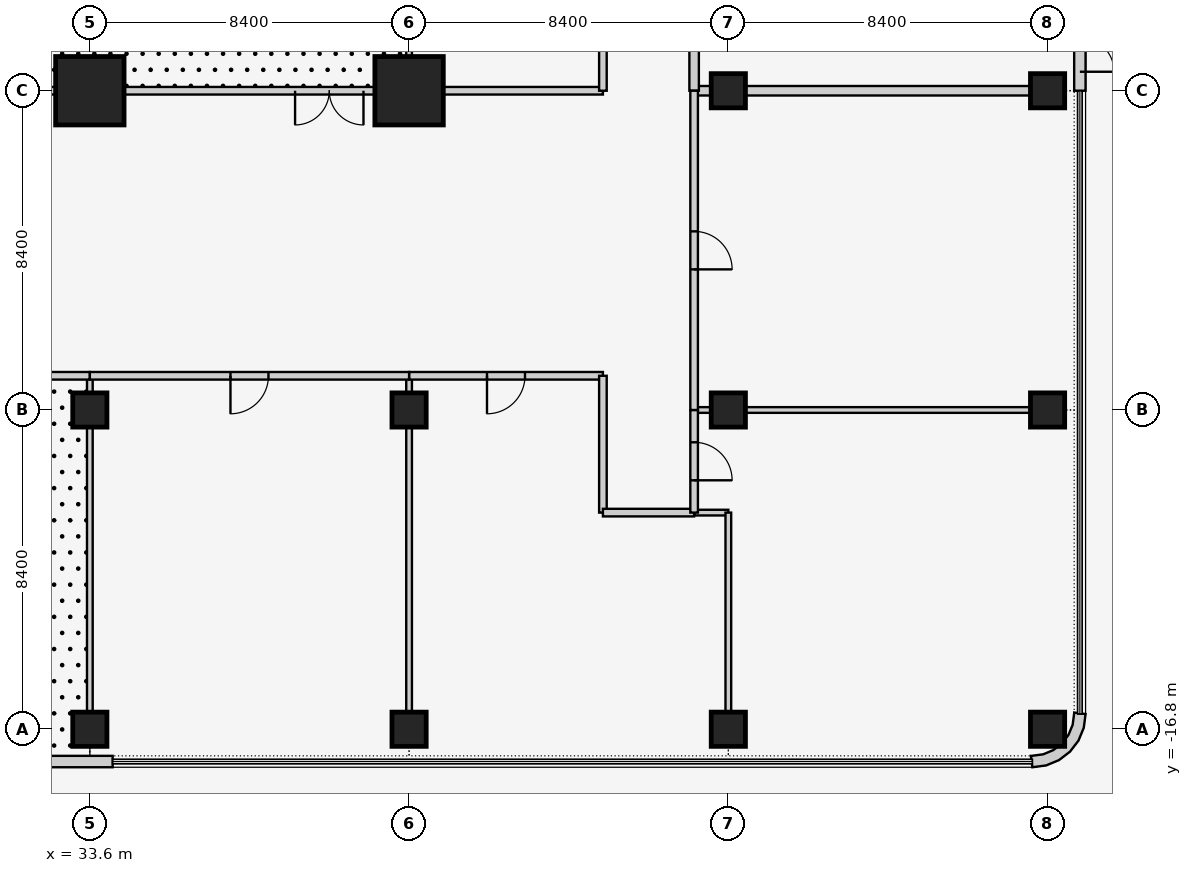
"""IFC4 building model, lengths in metres.
Left out: names, types, materials, properties, quantities, classifications, styles, units other than length and angle.
Written with IfcOpenShell. Run it as: python <this file> out.ifc"""

import sys

from ifc_helpers import new_model, si_unit, direction, frame, frame_2d, origin, origin_2d, place, context, subcontext, project, spatial, polyline, rectangle, outline, extrude, element, fill, save


model = new_model("IFC4")
c1 = context("Model", 3, precision=1e-05, world=origin(), true_north=direction((0.0, 1.0)))
c2 = subcontext(c1, "Body", "Model", "MODEL_VIEW")
j1 = project(units=[si_unit("LENGTHUNIT", "METRE"), si_unit("PLANEANGLEUNIT", "RADIAN")], contexts=[c1])
p1 = place(None, origin())
s1 = spatial("IfcSite", under=j1, at=p1, CompositionType="ELEMENT")
p2 = place(p1, origin())
s2 = spatial("IfcBuilding", under=s1, at=p2, CompositionType="ELEMENT")
p3 = place(p2, origin())
s3 = spatial("IfcBuildingStorey", under=s2, at=p3, CompositionType="ELEMENT", Elevation=0.0)
for number, where, z_axis, x_axis in (
    (1, (33.6, -16.8, 0.0), (0.0, 0.0, 1.0), (1.0, 0.0, 0.0)),
    (2, (33.6, -8.4, 0.0), (0.0, 0.0, 1.0), (1.0, 0.0, 0.0)),
):
    element("IfcColumn", number, at=place(p3, frame(where, z_axis=z_axis, x_axis=x_axis)), inside=s3, PredefinedType="COLUMN", context=c2, shape_type="SweptSolid", body=[
        extrude(rectangle(XDim=0.9, YDim=0.9, at=origin_2d()), origin(), (0.0, 0.0, 1.0), 6.0),
    ])
p4 = place(p3, frame((33.6, 0.0, 0.0), z_axis=(0.0, 0.0, 1.0), x_axis=(1.0, 0.0, 0.0)))
e3 = element("IfcColumn", 3, at=p4, inside=s3, PredefinedType="COLUMN", context=c2, shape_type="SweptSolid", body=[
    extrude(rectangle(XDim=1.8, YDim=1.8, at=origin_2d()), origin(), (0.0, 0.0, 1.0), 6.0),
])
for number, where, z_axis, x_axis in (
    (4, (42.0, -16.8, 0.0), (0.0, 0.0, 1.0), (1.0, 0.0, 0.0)),
    (5, (42.0, -8.4, 0.0), (0.0, 0.0, 1.0), (1.0, 0.0, 0.0)),
):
    element("IfcColumn", number, at=place(p3, frame(where, z_axis=z_axis, x_axis=x_axis)), inside=s3, PredefinedType="COLUMN", context=c2, shape_type="SweptSolid", body=[
        extrude(rectangle(XDim=0.9, YDim=0.9, at=origin_2d()), origin(), (0.0, 0.0, 1.0), 6.0),
    ])
p5 = place(p3, frame((42.0, 0.0, 0.0), z_axis=(0.0, 0.0, 1.0), x_axis=(1.0, 0.0, 0.0)))
e6 = element("IfcColumn", 6, at=p5, inside=s3, PredefinedType="COLUMN", context=c2, shape_type="SweptSolid", body=[
    extrude(rectangle(XDim=1.8, YDim=1.8, at=origin_2d()), origin(), (0.0, 0.0, 1.0), 6.0),
])
for number, where, z_axis, x_axis in (
    (7, (50.4, -16.8, 0.0), (0.0, 0.0, 1.0), (1.0, 0.0, 0.0)),
    (8, (50.4, -8.4, 0.0), (0.0, 0.0, 1.0), (1.0, 0.0, 0.0)),
    (9, (50.4, 0.0, 0.0), (0.0, 0.0, 1.0), (1.0, 0.0, 0.0)),
    (10, (58.8, -16.8, 0.0), (0.0, 0.0, 1.0), (1.0, 0.0, 0.0)),
    (11, (58.8, -8.4, 0.0), (0.0, 0.0, 1.0), (1.0, 0.0, 0.0)),
    (12, (58.8, 0.0, 0.0), (0.0, 0.0, 1.0), (1.0, 0.0, 0.0)),
):
    element("IfcColumn", number, at=place(p3, frame(where, z_axis=z_axis, x_axis=x_axis)), inside=s3, PredefinedType="COLUMN", context=c2, shape_type="SweptSolid", body=[
        extrude(rectangle(XDim=0.9, YDim=0.9, at=origin_2d()), origin(), (0.0, 0.0, 1.0), 6.0),
    ])
p6 = place(p3, frame((59.65, 0.0, 0.0), z_axis=(0.0, 0.0, 1.0), x_axis=(0.0, 1.0, 0.0)))
e13 = element("IfcWall", 13, at=p6, inside=s3, PredefinedType="SOLIDWALL", context=c2, shape_type="SweptSolid", body=[
    extrude(rectangle(XDim=3.0, YDim=0.3, at=frame_2d((1.5, 0.0))), origin(), (0.0, 0.0, 1.0), 5.8),
])
p7 = place(p6, frame((0.5, 0.0, 0.0)))
e14 = element("IfcOpeningElement", 14, at=p7, cuts=e13, PredefinedType="OPENING", context=c2, shape_type="SweptSolid", body=[
    extrude(rectangle(XDim=1.8, YDim=2.4, at=frame_2d((0.9, 1.2))), frame((0.0, 0.16, 0.0), z_axis=(0.0, -1.0, 0.0), x_axis=(1.0, 0.0, 0.0)), (0.0, 0.0, 1.0), 0.32),
])
p8 = place(p3, frame((16.8, -17.65, 0.0), z_axis=(0.0, 0.0, 1.0), x_axis=(1.0, 0.0, 0.0)))
e15 = element("IfcWall", 15, at=p8, inside=s3, PredefinedType="SOLIDWALL", context=c2, shape_type="SweptSolid", body=[
    extrude(rectangle(XDim=17.4, YDim=0.3, at=frame_2d((8.7, 0.0))), origin(), (0.0, 0.0, 1.0), 5.8),
])
p9 = place(p8, frame((1.8, 0.0, 0.0)))
e16 = element("IfcOpeningElement", 16, at=p9, cuts=e15, PredefinedType="OPENING", context=c2, shape_type="SweptSolid", body=[
    extrude(rectangle(XDim=1.8, YDim=2.4, at=frame_2d((0.9, 1.2))), frame((0.0, 0.16, 0.0), z_axis=(0.0, -1.0, 0.0), x_axis=(1.0, 0.0, 0.0)), (0.0, 0.0, 1.0), 0.32),
])
p10 = place(p8, frame((6.0, 0.0, 0.0)))
e17 = element("IfcOpeningElement", 17, at=p10, cuts=e15, PredefinedType="OPENING", context=c2, shape_type="SweptSolid", body=[
    extrude(rectangle(XDim=1.8, YDim=2.4, at=frame_2d((0.9, 1.2))), frame((0.0, 0.16, 0.0), z_axis=(0.0, -1.0, 0.0), x_axis=(1.0, 0.0, 0.0)), (0.0, 0.0, 1.0), 0.32),
])
p11 = place(p8, frame((9.6, 0.0, 0.0)))
e18 = element("IfcOpeningElement", 18, at=p11, cuts=e15, PredefinedType="OPENING", context=c2, shape_type="SweptSolid", body=[
    extrude(rectangle(XDim=1.8, YDim=2.4, at=frame_2d((0.9, 1.2))), frame((0.0, 0.16, 0.0), z_axis=(0.0, -1.0, 0.0), x_axis=(1.0, 0.0, 0.0)), (0.0, 0.0, 1.0), 0.32),
])
p12 = place(p8, frame((13.8, 0.0, 0.0)))
e19 = element("IfcOpeningElement", 19, at=p12, cuts=e15, PredefinedType="OPENING", context=c2, shape_type="SweptSolid", body=[
    extrude(rectangle(XDim=1.8, YDim=2.4, at=frame_2d((0.9, 1.2))), frame((0.0, 0.16, 0.0), z_axis=(0.0, -1.0, 0.0), x_axis=(1.0, 0.0, 0.0)), (0.0, 0.0, 1.0), 0.32),
])
p13 = place(p3, frame((58.355, -17.648, 0.0), z_axis=(0.0, 0.0, 1.0), x_axis=(0.707106781187, -0.707106781187, 0.0)))
e20 = element("IfcWall", 20, at=p13, inside=s3, PredefinedType="SOLIDWALL", context=c2, shape_type="SweptSolid", body=[
    extrude(outline(polyline([(0.139, 1.904), (-0.101, 1.72), (-0.087, 1.706), (0.1, 1.463), (0.209, 1.198), (0.246, 0.914), (0.209, 0.63), (0.1, 0.365), (-0.087, 0.122), (-0.101, 0.108), (0.139, -0.076), (0.362, 0.214), (0.502, 0.552), (0.549, 0.914), (0.502, 1.276), (0.362, 1.614), (0.139, 1.904)])), origin(), (0.0, 0.0, 1.0), 5.8),
])
p14 = place(p3, frame((49.95, 0.0, 0.0), z_axis=(0.0, 0.0, 1.0), x_axis=(-1.0, 0.0, 0.0)))
e21 = element("IfcWall", 21, at=p14, inside=s3, PredefinedType="SOLIDWALL", context=c2, shape_type="SweptSolid", body=[
    extrude(rectangle(XDim=0.45, YDim=0.25, at=frame_2d((0.225, 0.0))), origin(), (0.0, 0.0, 1.0), 5.043),
])
p15 = place(p3, frame((58.35, 0.0, 0.0), z_axis=(0.0, 0.0, 1.0), x_axis=(-1.0, 0.0, 0.0)))
e22 = element("IfcWall", 22, at=p15, inside=s3, PredefinedType="SOLIDWALL", context=c2, shape_type="SweptSolid", body=[
    extrude(rectangle(XDim=7.5, YDim=0.25, at=frame_2d((3.75, 0.0))), origin(), (0.0, 0.0, 1.0), 5.043),
])
p16 = place(p3, frame((49.5, 0.0, 0.0), z_axis=(0.0, 0.0, 1.0), x_axis=(0.0, 1.0, 0.0)))
e23 = element("IfcWall", 23, at=p16, inside=s3, PredefinedType="SOLIDWALL", context=c2, shape_type="SweptSolid", body=[
    extrude(rectangle(XDim=8.4, YDim=0.25, at=frame_2d((4.2, 0.0))), origin(), (0.0, 0.0, 1.0), 5.8),
])
p17 = place(p16, frame((3.6, 0.0, 0.0)))
e24 = element("IfcOpeningElement", 24, at=p17, cuts=e23, PredefinedType="OPENING", context=c2, shape_type="SweptSolid", body=[
    extrude(rectangle(XDim=1.2, YDim=2.1, at=frame_2d((0.6, 1.05))), frame((0.0, 0.135, 0.0), z_axis=(0.0, -1.0, 0.0), x_axis=(1.0, 0.0, 0.0)), (0.0, 0.0, 1.0), 0.27),
])
p18 = place(p3, frame((49.5, -11.1, 0.0), z_axis=(0.0, 0.0, 1.0), x_axis=(1.0, 0.0, 0.0)))
e25 = element("IfcWall", 25, at=p18, inside=s3, PredefinedType="PARTITIONING", context=c2, shape_type="SweptSolid", body=[
    extrude(rectangle(XDim=0.9, YDim=0.15, at=frame_2d((0.45, 0.0))), origin(), (0.0, 0.0, 1.0), 5.8),
])
p19 = place(p3, frame((50.4, -11.1, 0.0), z_axis=(0.0, 0.0, 1.0), x_axis=(0.0, -1.0, 0.0)))
e26 = element("IfcWall", 26, at=p19, inside=s3, PredefinedType="PARTITIONING", context=c2, shape_type="SweptSolid", body=[
    extrude(rectangle(XDim=5.25, YDim=0.15, at=frame_2d((2.625, 0.0))), origin(), (0.0, 0.0, 1.0), 5.043),
])
p20 = place(p3, frame((42.0, -16.35, 0.0), z_axis=(0.0, 0.0, 1.0), x_axis=(0.0, 1.0, 0.0)))
e27 = element("IfcWall", 27, at=p20, inside=s3, PredefinedType="PARTITIONING", context=c2, shape_type="SweptSolid", body=[
    extrude(rectangle(XDim=7.5, YDim=0.15, at=frame_2d((3.75, 0.0))), origin(), (0.0, 0.0, 1.0), 5.043),
])
p21 = place(p3, frame((42.0, -7.95, 0.0), z_axis=(0.0, 0.0, 1.0), x_axis=(0.0, 1.0, 0.0)))
e28 = element("IfcWall", 28, at=p21, inside=s3, PredefinedType="PARTITIONING", context=c2, shape_type="SweptSolid", body=[
    extrude(rectangle(XDim=0.45, YDim=0.15, at=frame_2d((0.225, 0.0))), origin(), (0.0, 0.0, 1.0), 5.043),
])
p22 = place(p3, frame((42.0, -7.5, 0.0), z_axis=(0.0, 0.0, 1.0), x_axis=(1.0, 0.0, 0.0)))
e29 = element("IfcWall", 29, at=p22, inside=s3, PredefinedType="PARTITIONING", context=c2, shape_type="SweptSolid", body=[
    extrude(rectangle(XDim=5.1, YDim=0.2, at=frame_2d((2.55, 0.0))), origin(), (0.0, 0.0, 1.0), 5.8),
])
p23 = place(p22, frame((2.05, 0.0, 0.0)))
e30 = element("IfcOpeningElement", 30, at=p23, cuts=e29, PredefinedType="OPENING", context=c2, shape_type="SweptSolid", body=[
    extrude(rectangle(XDim=1.0, YDim=2.1, at=frame_2d((0.5, 1.05))), frame((0.0, 0.11, 0.0), z_axis=(0.0, -1.0, 0.0), x_axis=(1.0, 0.0, 0.0)), (0.0, 0.0, 1.0), 0.22),
])
p24 = place(p3, frame((47.1, -7.5, 0.0), z_axis=(0.0, 0.0, 1.0), x_axis=(0.0, -1.0, 0.0)))
e31 = element("IfcWall", 31, at=p24, inside=s3, PredefinedType="PARTITIONING", context=c2, shape_type="SweptSolid", body=[
    extrude(rectangle(XDim=3.6, YDim=0.2, at=frame_2d((1.8, 0.0))), origin(), (0.0, 0.0, 1.0), 5.8),
])
p25 = place(p3, frame((47.1, -11.1, 0.0), z_axis=(0.0, 0.0, 1.0), x_axis=(1.0, 0.0, 0.0)))
e32 = element("IfcWall", 32, at=p25, inside=s3, PredefinedType="PARTITIONING", context=c2, shape_type="SweptSolid", body=[
    extrude(rectangle(XDim=2.4, YDim=0.2, at=frame_2d((1.2, 0.0))), origin(), (0.0, 0.0, 1.0), 5.8),
])
p26 = place(p3, frame((49.5, -8.4, 0.0), z_axis=(0.0, 0.0, 1.0), x_axis=(1.0, 0.0, 0.0)))
e33 = element("IfcWall", 33, at=p26, inside=s3, PredefinedType="PARTITIONING", context=c2, shape_type="SweptSolid", body=[
    extrude(rectangle(XDim=0.45, YDim=0.15, at=frame_2d((0.225, 0.0))), origin(), (0.0, 0.0, 1.0), 5.043),
])
p27 = place(p3, frame((50.85, -8.4, 0.0), z_axis=(0.0, 0.0, 1.0), x_axis=(1.0, 0.0, 0.0)))
e34 = element("IfcWall", 34, at=p27, inside=s3, PredefinedType="PARTITIONING", context=c2, shape_type="SweptSolid", body=[
    extrude(rectangle(XDim=7.5, YDim=0.15, at=frame_2d((3.75, 0.0))), origin(), (0.0, 0.0, 1.0), 5.043),
])
p28 = place(p3, frame((49.5, -11.1, 0.0), z_axis=(0.0, 0.0, 1.0), x_axis=(0.0, 1.0, 0.0)))
e35 = element("IfcWall", 35, at=p28, inside=s3, PredefinedType="PARTITIONING", context=c2, shape_type="SweptSolid", body=[
    extrude(rectangle(XDim=2.7, YDim=0.2, at=frame_2d((1.35, 0.0))), origin(), (0.0, 0.0, 1.0), 5.8),
])
p29 = place(p28, frame((0.85, 0.0, 0.0)))
e36 = element("IfcOpeningElement", 36, at=p29, cuts=e35, PredefinedType="OPENING", context=c2, shape_type="SweptSolid", body=[
    extrude(rectangle(XDim=1.0, YDim=2.1, at=frame_2d((0.5, 1.05))), frame((0.0, 0.11, 0.0), z_axis=(0.0, -1.0, 0.0), x_axis=(1.0, 0.0, 0.0)), (0.0, 0.0, 1.0), 0.22),
])
p30 = place(p3, frame((33.6, -8.85, 0.0), z_axis=(0.0, 0.0, 1.0), x_axis=(0.0, -1.0, 0.0)))
e37 = element("IfcWall", 37, at=p30, inside=s3, PredefinedType="PARTITIONING", context=c2, shape_type="SweptSolid", body=[
    extrude(rectangle(XDim=7.5, YDim=0.15, at=frame_2d((3.75, 0.0))), origin(), (0.0, 0.0, 1.0), 5.043),
])
p31 = place(p3, frame((33.6, -7.5, 0.0), z_axis=(0.0, 0.0, 1.0), x_axis=(0.0, -1.0, 0.0)))
e38 = element("IfcWall", 38, at=p31, inside=s3, PredefinedType="PARTITIONING", context=c2, shape_type="SweptSolid", body=[
    extrude(rectangle(XDim=0.45, YDim=0.15, at=frame_2d((0.225, 0.0))), origin(), (0.0, 0.0, 1.0), 5.043),
])
p32 = place(p3, frame((25.65, -7.5, 0.0), z_axis=(0.0, 0.0, 1.0), x_axis=(1.0, 0.0, 0.0)))
e39 = element("IfcWall", 39, at=p32, inside=s3, PredefinedType="PARTITIONING", context=c2, shape_type="SweptSolid", body=[
    extrude(rectangle(XDim=7.95, YDim=0.2, at=frame_2d((3.975, 0.0))), origin(), (0.0, 0.0, 1.0), 5.8),
])
p33 = place(p32, frame((3.075, 0.0, 0.0)))
e40 = element("IfcOpeningElement", 40, at=p33, cuts=e39, PredefinedType="OPENING", context=c2, shape_type="SweptSolid", body=[
    extrude(rectangle(XDim=1.8, YDim=2.4, at=frame_2d((0.9, 1.2))), frame((0.0, 0.11, 0.0), z_axis=(0.0, -1.0, 0.0), x_axis=(1.0, 0.0, 0.0)), (0.0, 0.0, 1.0), 0.22),
])
p34 = place(p3, frame((33.6, -7.5, 0.0), z_axis=(0.0, 0.0, 1.0), x_axis=(1.0, 0.0, 0.0)))
e41 = element("IfcWall", 41, at=p34, inside=s3, PredefinedType="PARTITIONING", context=c2, shape_type="SweptSolid", body=[
    extrude(rectangle(XDim=8.4, YDim=0.2, at=frame_2d((4.2, 0.0))), origin(), (0.0, 0.0, 1.0), 5.8),
])
p35 = place(p34, frame((3.7, 0.0, 0.0)))
e42 = element("IfcOpeningElement", 42, at=p35, cuts=e41, PredefinedType="OPENING", context=c2, shape_type="SweptSolid", body=[
    extrude(rectangle(XDim=1.0, YDim=2.1, at=frame_2d((0.5, 1.05))), frame((0.0, 0.11, 0.0), z_axis=(0.0, -1.0, 0.0), x_axis=(1.0, 0.0, 0.0)), (0.0, 0.0, 1.0), 0.22),
])
p36 = place(p3, frame((49.5, -8.4, 0.0), z_axis=(0.0, 0.0, 1.0), x_axis=(0.0, 1.0, 0.0)))
e43 = element("IfcWall", 43, at=p36, inside=s3, PredefinedType="PARTITIONING", context=c2, shape_type="SweptSolid", body=[
    extrude(rectangle(XDim=8.4, YDim=0.2, at=frame_2d((4.2, 0.0))), origin(), (0.0, 0.0, 1.0), 5.8),
])
p37 = place(p36, frame((3.7, 0.0, 0.0)))
e44 = element("IfcOpeningElement", 44, at=p37, cuts=e43, PredefinedType="OPENING", context=c2, shape_type="SweptSolid", body=[
    extrude(rectangle(XDim=1.0, YDim=2.1, at=frame_2d((0.5, 1.05))), frame((0.0, 0.11, 0.0), z_axis=(0.0, -1.0, 0.0), x_axis=(1.0, 0.0, 0.0)), (0.0, 0.0, 1.0), 0.22),
])
p38 = place(p3, frame((26.1, 0.0, 0.0), z_axis=(0.0, 0.0, 1.0), x_axis=(1.0, 0.0, 0.0)))
e45 = element("IfcWall", 45, at=p38, inside=s3, PredefinedType="PARTITIONING", context=c2, shape_type="SweptSolid", body=[
    extrude(rectangle(XDim=6.6, YDim=0.2, at=frame_2d((3.3, 0.0))), origin(), (0.0, 0.0, 1.0), 5.043),
])
p39 = place(p3, frame((34.5, 0.0, 0.0), z_axis=(0.0, 0.0, 1.0), x_axis=(1.0, 0.0, 0.0)))
e46 = element("IfcWall", 46, at=p39, inside=s3, PredefinedType="PARTITIONING", context=c2, shape_type="SweptSolid", body=[
    extrude(rectangle(XDim=6.6, YDim=0.2, at=frame_2d((3.3, 0.0))), origin(), (0.0, 0.0, 1.0), 5.043),
])
p40 = place(p39, frame((4.5, 0.0, 0.0)))
e47 = element("IfcOpeningElement", 47, at=p40, cuts=e46, PredefinedType="OPENING", context=c2, shape_type="SweptSolid", body=[
    extrude(rectangle(XDim=1.8, YDim=2.4, at=frame_2d((0.9, 1.2))), frame((0.0, 0.11, 0.0), z_axis=(0.0, -1.0, 0.0), x_axis=(1.0, 0.0, 0.0)), (0.0, 0.0, 1.0), 0.22),
])
p41 = place(p3, frame((42.9, 0.0, 0.0), z_axis=(0.0, 0.0, 1.0), x_axis=(1.0, 0.0, 0.0)))
e48 = element("IfcWall", 48, at=p41, inside=s3, PredefinedType="PARTITIONING", context=c2, shape_type="SweptSolid", body=[
    extrude(rectangle(XDim=4.2, YDim=0.2, at=frame_2d((2.1, 0.0))), origin(), (0.0, 0.0, 1.0), 5.043),
])
p42 = place(p3, frame((47.1, 0.0, 0.0), z_axis=(0.0, 0.0, 1.0), x_axis=(0.0, 1.0, 0.0)))
e49 = element("IfcWall", 49, at=p42, inside=s3, PredefinedType="PARTITIONING", context=c2, shape_type="SweptSolid", body=[
    extrude(rectangle(XDim=8.4, YDim=0.2, at=frame_2d((4.2, 0.0))), origin(), (0.0, 0.0, 1.0), 5.8),
])
p43 = place(p42, frame((3.7, 0.0, 0.0)))
e50 = element("IfcOpeningElement", 50, at=p43, cuts=e49, PredefinedType="OPENING", context=c2, shape_type="SweptSolid", body=[
    extrude(rectangle(XDim=1.0, YDim=2.1, at=frame_2d((0.5, 1.05))), frame((0.0, 0.11, 0.0), z_axis=(0.0, -1.0, 0.0), x_axis=(1.0, 0.0, 0.0)), (0.0, 0.0, 1.0), 0.22),
])
p44 = place(p3, frame((42.0, 7.5, 0.0), z_axis=(0.0, 0.0, 1.0), x_axis=(0.0, -1.0, 0.0)))
e51 = element("IfcWall", 51, at=p44, inside=s3, PredefinedType="PARTITIONING", context=c2, shape_type="SweptSolid", body=[
    extrude(rectangle(XDim=6.6, YDim=0.15, at=frame_2d((3.3, 0.0))), origin(), (0.0, 0.0, 1.0), 5.043),
])
p45 = place(p7, frame((1.8, 0.0, 0.0), z_axis=(0.0, 0.0, 1.0), x_axis=(-1.0, 0.0, 0.0)))
e52 = element("IfcDoor", 52, at=p45, inside=s3, OperationType="DOUBLE_DOOR_SINGLE_SWING", PredefinedType="DOOR", context=c2, shape_type="SweptSolid", body=[
    extrude(rectangle(XDim=1.8, YDim=2.4, at=frame_2d((0.9, 1.2))), frame((0.0, 0.025, 0.0), z_axis=(0.0, -1.0, 0.0), x_axis=(1.0, 0.0, 0.0)), (0.0, 0.0, 1.0), 0.05),
])
fill(e14, e52)
p46 = place(p23, frame((1.0, 0.0, 0.0), z_axis=(0.0, 0.0, 1.0), x_axis=(-1.0, 0.0, 0.0)))
e53 = element("IfcDoor", 53, at=p46, inside=s3, OperationType="SINGLE_SWING_RIGHT", PredefinedType="DOOR", context=c2, shape_type="SweptSolid", body=[
    extrude(rectangle(XDim=1.0, YDim=2.1, at=frame_2d((0.5, 1.05))), frame((0.0, 0.025, 0.0), z_axis=(0.0, -1.0, 0.0), x_axis=(1.0, 0.0, 0.0)), (0.0, 0.0, 1.0), 0.05),
])
fill(e30, e53)
p47 = place(p29, frame((1.0, 0.0, 0.0), z_axis=(0.0, 0.0, 1.0), x_axis=(-1.0, 0.0, 0.0)))
e54 = element("IfcDoor", 54, at=p47, inside=s3, OperationType="SINGLE_SWING_RIGHT", PredefinedType="DOOR", context=c2, shape_type="SweptSolid", body=[
    extrude(rectangle(XDim=1.0, YDim=2.1, at=frame_2d((0.5, 1.05))), frame((0.0, 0.025, 0.0), z_axis=(0.0, -1.0, 0.0), x_axis=(1.0, 0.0, 0.0)), (0.0, 0.0, 1.0), 0.05),
])
fill(e36, e54)
p48 = place(p35, frame((1.0, 0.0, 0.0), z_axis=(0.0, 0.0, 1.0), x_axis=(-1.0, 0.0, 0.0)))
e55 = element("IfcDoor", 55, at=p48, inside=s3, OperationType="SINGLE_SWING_RIGHT", PredefinedType="DOOR", context=c2, shape_type="SweptSolid", body=[
    extrude(rectangle(XDim=1.0, YDim=2.1, at=frame_2d((0.5, 1.05))), frame((0.0, 0.025, 0.0), z_axis=(0.0, -1.0, 0.0), x_axis=(1.0, 0.0, 0.0)), (0.0, 0.0, 1.0), 0.05),
])
fill(e42, e55)
p49 = place(p37, frame((1.0, 0.0, 0.0), z_axis=(0.0, 0.0, 1.0), x_axis=(-1.0, 0.0, 0.0)))
e56 = element("IfcDoor", 56, at=p49, inside=s3, OperationType="SINGLE_SWING_RIGHT", PredefinedType="DOOR", context=c2, shape_type="SweptSolid", body=[
    extrude(rectangle(XDim=1.0, YDim=2.1, at=frame_2d((0.5, 1.05))), frame((0.0, 0.025, 0.0), z_axis=(0.0, -1.0, 0.0), x_axis=(1.0, 0.0, 0.0)), (0.0, 0.0, 1.0), 0.05),
])
fill(e44, e56)
p50 = place(p40, frame((1.8, 0.0, 0.0), z_axis=(0.0, 0.0, 1.0), x_axis=(-1.0, 0.0, 0.0)))
e57 = element("IfcDoor", 57, at=p50, inside=s3, OperationType="DOUBLE_DOOR_SINGLE_SWING", PredefinedType="DOOR", context=c2, shape_type="SweptSolid", body=[
    extrude(rectangle(XDim=1.8, YDim=2.4, at=frame_2d((0.9, 1.2))), frame((0.0, 0.025, 0.0), z_axis=(0.0, -1.0, 0.0), x_axis=(1.0, 0.0, 0.0)), (0.0, 0.0, 1.0), 0.05),
])
fill(e47, e57)
save(model, sys.argv[1])
